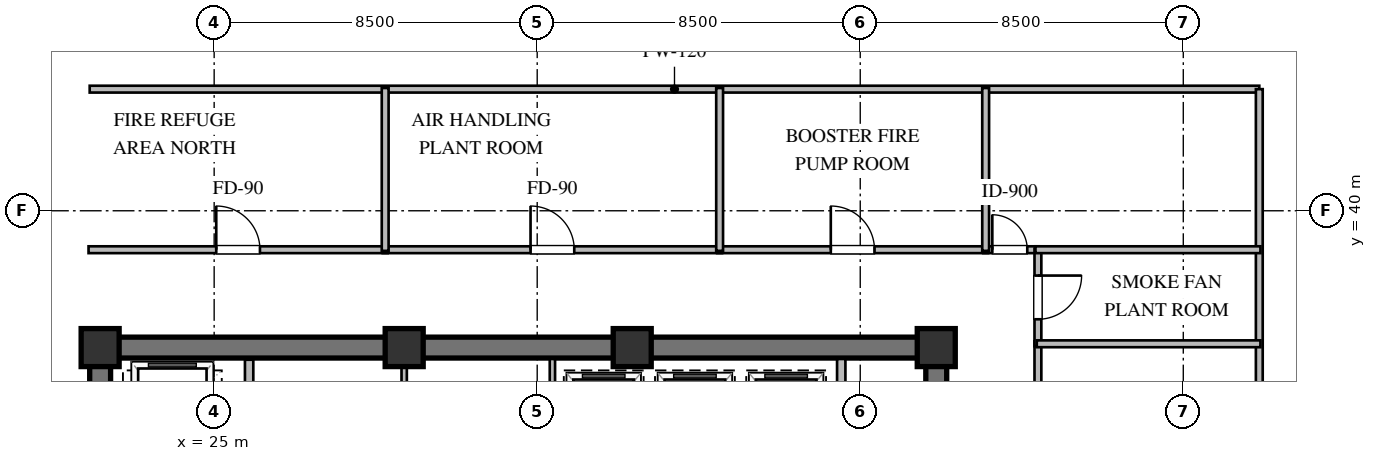
"""IFC4 building model, lengths in metres.
Left out: names, types, materials, properties, quantities, classifications, styles, units other than length and angle.
Written with IfcOpenShell. Run it as: python <this file> out.ifc"""

import sys

from ifc_helpers import new_model, si_unit, direction, frame, frame_2d, origin, origin_2d, place, context, subcontext, project, spatial, rectangle, extrude, element, fill, save


model = new_model("IFC4")
c1 = context("Model", 3, precision=1e-05, world=origin(), true_north=direction((0.0, 1.0)))
c2 = subcontext(c1, "Body", "Model", "MODEL_VIEW")
j1 = project(units=[si_unit("LENGTHUNIT", "METRE"), si_unit("PLANEANGLEUNIT", "RADIAN")], contexts=[c1])
p1 = place(None, origin())
s1 = spatial("IfcSite", under=j1, at=p1, CompositionType="ELEMENT")
p2 = place(p1, origin())
s2 = spatial("IfcBuilding", under=s1, at=p2, CompositionType="ELEMENT")
p3 = place(p2, frame((0.0, 0.0, 181.8)))
s3 = spatial("IfcBuildingStorey", under=s2, at=p3, CompositionType="ELEMENT", Elevation=181.8)
p4 = place(p3, frame((21.725, 36.4, 0.0), z_axis=(0.0, 0.0, 1.0), x_axis=(1.0, 0.0, 0.0)))
e1 = element("IfcWall", 1, at=p4, inside=s3, PredefinedType="SHEAR", context=c2, shape_type="SweptSolid", body=[
    extrude(rectangle(XDim=22.55, YDim=0.55, at=frame_2d((11.275, 0.0))), origin(), (0.0, 0.0, 1.0), 5.16),
])
p5 = place(p3, frame((22.0, 23.875, 0.0), z_axis=(0.0, 0.0, 1.0), x_axis=(0.0, 1.0, 0.0)))
e2 = element("IfcWall", 2, at=p5, inside=s3, PredefinedType="SHEAR", context=c2, shape_type="SweptSolid", body=[
    extrude(rectangle(XDim=12.25, YDim=0.55, at=frame_2d((6.125, 0.0))), origin(), (0.0, 0.0, 1.0), 5.16),
])
p6 = place(p3, frame((44.0, 23.875, 0.0), z_axis=(0.0, 0.0, 1.0), x_axis=(0.0, 1.0, 0.0)))
e3 = element("IfcWall", 3, at=p6, inside=s3, PredefinedType="SHEAR", context=c2, shape_type="SweptSolid", body=[
    extrude(rectangle(XDim=12.25, YDim=0.55, at=frame_2d((6.125, 0.0))), origin(), (0.0, 0.0, 1.0), 5.16),
])
p7 = place(p6, frame((8.725, 0.0, 0.0)))
e4 = element("IfcOpeningElement", 4, at=p7, cuts=e3, PredefinedType="OPENING", context=c2, shape_type="SweptSolid", body=[
    extrude(rectangle(XDim=1.5, YDim=2.15, at=frame_2d((0.75, 1.075))), frame((0.0, 0.285, 0.0), z_axis=(0.0, -1.0, 0.0), x_axis=(1.0, 0.0, 0.0)), (0.0, 0.0, 1.0), 0.57),
])
for number, where, z_axis, x_axis in (
    (5, (44.0, 36.4, 0.0), (0.0, 0.0, 1.0), (1.0, 0.0, 0.0)),
    (6, (36.0, 36.4, 0.0), (0.0, 0.0, 1.0), (1.0, 0.0, 0.0)),
    (7, (30.0, 36.4, 0.0), (0.0, 0.0, 1.0), (1.0, 0.0, 0.0)),
    (8, (22.0, 36.4, 0.0), (0.0, 0.0, 1.0), (1.0, 0.0, 0.0)),
):
    element("IfcColumn", number, at=place(p3, frame(where, z_axis=z_axis, x_axis=x_axis)), inside=s3, PredefinedType="COLUMN", context=c2, shape_type="SweptSolid", body=[
        extrude(rectangle(XDim=1.0, YDim=1.0, at=origin_2d()), origin(), (0.0, 0.0, 1.0), 5.4),
    ])
p8 = place(p3, frame((25.92, 33.35, 0.0), z_axis=(0.0, 0.0, 1.0), x_axis=(0.0, 1.0, 0.0)))
e9 = element("IfcWall", 9, at=p8, inside=s3, PredefinedType="SOLIDWALL", context=c2, shape_type="SweptSolid", body=[
    extrude(rectangle(XDim=2.73, YDim=0.22, at=frame_2d((1.365, 0.0))), origin(), (0.0, 0.0, 1.0), 5.16),
])
for number, where, z_axis, x_axis in (
    (10, (30.0, 33.35, 0.0), (0.0, 0.0, 1.0), (0.0, 1.0, 0.0)),
    (11, (33.9, 33.35, 0.0), (0.0, 0.0, 1.0), (0.0, 1.0, 0.0)),
):
    element("IfcWall", number, at=place(p3, frame(where, z_axis=z_axis, x_axis=x_axis)), inside=s3, PredefinedType="PARTITIONING", context=c2, shape_type="SweptSolid", body=[
        extrude(rectangle(XDim=2.75, YDim=0.14, at=frame_2d((1.375, 0.0))), origin(), (0.0, 0.0, 1.0), 5.16),
    ])
p9 = place(p3, frame((41.5, 33.35, 0.0), z_axis=(0.0, 0.0, 1.0), x_axis=(0.0, 1.0, 0.0)))
e12 = element("IfcWall", 12, at=p9, inside=s3, PredefinedType="SOLIDWALL", context=c2, shape_type="SweptSolid", body=[
    extrude(rectangle(XDim=2.75, YDim=0.22, at=frame_2d((1.375, 0.0))), origin(), (0.0, 0.0, 1.0), 5.16),
])
p10 = place(p3, frame((21.725, 43.2, 0.0), z_axis=(0.0, 0.0, 1.0), x_axis=(1.0, 0.0, 0.0)))
e13 = element("IfcWall", 13, at=p10, inside=s3, PredefinedType="PARTITIONING", context=c2, shape_type="SweptSolid", body=[
    extrude(rectangle(XDim=30.775, YDim=0.18, at=frame_2d((15.387, 0.0))), origin(), (0.0, 0.0, 1.0), 5.16),
])
p11 = place(p3, frame((52.5, 23.4, 0.0), z_axis=(0.0, 0.0, 1.0), x_axis=(0.0, 1.0, 0.0)))
e14 = element("IfcWall", 14, at=p11, inside=s3, PredefinedType="PARTITIONING", context=c2, shape_type="SweptSolid", body=[
    extrude(rectangle(XDim=19.8, YDim=0.18, at=frame_2d((9.9, 0.0))), origin(), (0.0, 0.0, 1.0), 5.16),
])
p12 = place(p3, frame((21.695, 38.975, 0.0), z_axis=(0.0, 0.0, 1.0), x_axis=(1.0, 0.0, 0.0)))
e15 = element("IfcWall", 15, at=p12, inside=s3, PredefinedType="PARTITIONING", context=c2, shape_type="SweptSolid", body=[
    extrude(rectangle(XDim=7.87, YDim=0.18, at=frame_2d((3.935, 0.0))), origin(), (0.0, 0.0, 1.0), 5.16),
])
p13 = place(p12, frame((3.36, 0.0, 0.0)))
e16 = element("IfcOpeningElement", 16, at=p13, cuts=e15, PredefinedType="OPENING", context=c2, shape_type="SweptSolid", body=[
    extrude(rectangle(XDim=1.15, YDim=2.1, at=frame_2d((0.575, 1.05))), frame((0.0, 0.1, 0.0), z_axis=(0.0, -1.0, 0.0), x_axis=(1.0, 0.0, 0.0)), (0.0, 0.0, 1.0), 0.2),
])
p14 = place(p3, frame((46.675, 36.565, 0.0), z_axis=(0.0, 0.0, 1.0), x_axis=(0.0, -1.0, 0.0)))
e17 = element("IfcWall", 17, at=p14, inside=s3, PredefinedType="PARTITIONING", context=c2, shape_type="SweptSolid", body=[
    extrude(rectangle(XDim=13.195, YDim=0.18, at=frame_2d((6.597, 0.0))), origin(), (0.0, 0.0, 1.0), 5.16),
])
p15 = place(p14, frame((6.022, 0.0, 0.0)))
e18 = element("IfcOpeningElement", 18, at=p15, cuts=e17, PredefinedType="OPENING", context=c2, shape_type="SweptSolid", body=[
    extrude(rectangle(XDim=1.15, YDim=2.1, at=frame_2d((0.575, 1.05))), frame((0.0, 0.1, 0.0), z_axis=(0.0, -1.0, 0.0), x_axis=(1.0, 0.0, 0.0)), (0.0, 0.0, 1.0), 0.2),
])
p16 = place(p3, frame((29.435, 38.975, 0.0), z_axis=(0.0, 0.0, 1.0), x_axis=(1.0, 0.0, 0.0)))
e19 = element("IfcWall", 19, at=p16, inside=s3, PredefinedType="PARTITIONING", context=c2, shape_type="SweptSolid", body=[
    extrude(rectangle(XDim=8.93, YDim=0.18, at=frame_2d((4.465, 0.0))), origin(), (0.0, 0.0, 1.0), 5.16),
])
p17 = place(p16, frame((3.89, 0.0, 0.0)))
e20 = element("IfcOpeningElement", 20, at=p17, cuts=e19, PredefinedType="OPENING", context=c2, shape_type="SweptSolid", body=[
    extrude(rectangle(XDim=1.15, YDim=2.1, at=frame_2d((0.575, 1.05))), frame((0.0, 0.1, 0.0), z_axis=(0.0, -1.0, 0.0), x_axis=(1.0, 0.0, 0.0)), (0.0, 0.0, 1.0), 0.2),
])
p18 = place(p3, frame((38.235, 38.975, 0.0), z_axis=(0.0, 0.0, 1.0), x_axis=(1.0, 0.0, 0.0)))
e21 = element("IfcWall", 21, at=p18, inside=s3, PredefinedType="PARTITIONING", context=c2, shape_type="SweptSolid", body=[
    extrude(rectangle(XDim=7.13, YDim=0.18, at=frame_2d((3.565, 0.0))), origin(), (0.0, 0.0, 1.0), 5.16),
])
p19 = place(p18, frame((2.99, 0.0, 0.0)))
e22 = element("IfcOpeningElement", 22, at=p19, cuts=e21, PredefinedType="OPENING", context=c2, shape_type="SweptSolid", body=[
    extrude(rectangle(XDim=1.15, YDim=2.1, at=frame_2d((0.575, 1.05))), frame((0.0, 0.1, 0.0), z_axis=(0.0, -1.0, 0.0), x_axis=(1.0, 0.0, 0.0)), (0.0, 0.0, 1.0), 0.2),
])
p20 = place(p3, frame((45.235, 38.975, 0.0), z_axis=(0.0, 0.0, 1.0), x_axis=(1.0, 0.0, 0.0)))
e23 = element("IfcWall", 23, at=p20, inside=s3, PredefinedType="PARTITIONING", context=c2, shape_type="SweptSolid", body=[
    extrude(rectangle(XDim=1.47, YDim=0.18, at=frame_2d((0.735, 0.0))), origin(), (0.0, 0.0, 1.0), 5.16),
])
p21 = place(p20, frame((0.24, 0.0, 0.0)))
e24 = element("IfcOpeningElement", 24, at=p21, cuts=e23, PredefinedType="OPENING", context=c2, shape_type="SweptSolid", body=[
    extrude(rectangle(XDim=0.92, YDim=2.1, at=frame_2d((0.46, 1.05))), frame((0.0, 0.1, 0.0), z_axis=(0.0, -1.0, 0.0), x_axis=(1.0, 0.0, 0.0)), (0.0, 0.0, 1.0), 0.2),
])
p22 = place(p3, frame((46.675, 39.005, 0.0), z_axis=(0.0, 0.0, 1.0), x_axis=(0.0, -1.0, 0.0)))
e25 = element("IfcWall", 25, at=p22, inside=s3, PredefinedType="PARTITIONING", context=c2, shape_type="SweptSolid", body=[
    extrude(rectangle(XDim=2.57, YDim=0.18, at=frame_2d((1.285, 0.0))), origin(), (0.0, 0.0, 1.0), 5.16),
])
p23 = place(p22, frame((0.71, 0.0, 0.0)))
e26 = element("IfcOpeningElement", 26, at=p23, cuts=e25, PredefinedType="OPENING", context=c2, shape_type="SweptSolid", body=[
    extrude(rectangle(XDim=1.15, YDim=2.1, at=frame_2d((0.575, 1.05))), frame((0.0, 0.1, 0.0), z_axis=(0.0, -1.0, 0.0), x_axis=(1.0, 0.0, 0.0)), (0.0, 0.0, 1.0), 0.2),
])
p24 = place(p3, frame((29.5, 43.23, 0.0), z_axis=(0.0, 0.0, 1.0), x_axis=(0.0, -1.0, 0.0)))
e27 = element("IfcWall", 27, at=p24, inside=s3, PredefinedType="PARTITIONING", context=c2, shape_type="SweptSolid", body=[
    extrude(rectangle(XDim=4.285, YDim=0.18, at=frame_2d((2.143, 0.0))), origin(), (0.0, 0.0, 1.0), 5.16),
])
p25 = place(p3, frame((46.645, 36.5, 0.0), z_axis=(0.0, 0.0, 1.0), x_axis=(1.0, 0.0, 0.0)))
e28 = element("IfcWall", 28, at=p25, inside=s3, PredefinedType="PARTITIONING", context=c2, shape_type="SweptSolid", body=[
    extrude(rectangle(XDim=5.885, YDim=0.18, at=frame_2d((2.942, 0.0))), origin(), (0.0, 0.0, 1.0), 3.65),
])
for number, where, z_axis, x_axis in (
    (29, (38.3, 43.23, 0.0), (0.0, 0.0, 1.0), (0.0, -1.0, 0.0)),
    (30, (45.3, 43.23, 0.0), (0.0, 0.0, 1.0), (0.0, -1.0, 0.0)),
):
    element("IfcWall", number, at=place(p3, frame(where, z_axis=z_axis, x_axis=x_axis)), inside=s3, PredefinedType="PARTITIONING", context=c2, shape_type="SweptSolid", body=[
        extrude(rectangle(XDim=4.285, YDim=0.18, at=frame_2d((2.143, 0.0))), origin(), (0.0, 0.0, 1.0), 5.16),
    ])
p26 = place(p3, frame((52.53, 38.975, 0.0), z_axis=(0.0, 0.0, 1.0), x_axis=(-1.0, 0.0, 0.0)))
e31 = element("IfcWall", 31, at=p26, inside=s3, PredefinedType="PARTITIONING", context=c2, shape_type="SweptSolid", body=[
    extrude(rectangle(XDim=5.92, YDim=0.18, at=frame_2d((2.96, 0.0))), origin(), (0.0, 0.0, 1.0), 5.16),
])
p27 = place(p13, origin())
e32 = element("IfcDoor", 32, at=p27, inside=s3, OperationType="SINGLE_SWING_LEFT", PredefinedType="DOOR", context=c2, shape_type="SweptSolid", body=[
    extrude(rectangle(XDim=1.15, YDim=2.1, at=frame_2d((0.575, 1.05))), frame((0.0, 0.025, 0.0), z_axis=(0.0, -1.0, 0.0), x_axis=(1.0, 0.0, 0.0)), (0.0, 0.0, 1.0), 0.05),
])
fill(e16, e32)
p28 = place(p17, origin())
e33 = element("IfcDoor", 33, at=p28, inside=s3, OperationType="SINGLE_SWING_LEFT", PredefinedType="DOOR", context=c2, shape_type="SweptSolid", body=[
    extrude(rectangle(XDim=1.15, YDim=2.1, at=frame_2d((0.575, 1.05))), frame((0.0, 0.025, 0.0), z_axis=(0.0, -1.0, 0.0), x_axis=(1.0, 0.0, 0.0)), (0.0, 0.0, 1.0), 0.05),
])
fill(e20, e33)
p29 = place(p19, origin())
e34 = element("IfcDoor", 34, at=p29, inside=s3, OperationType="SINGLE_SWING_LEFT", PredefinedType="DOOR", context=c2, shape_type="SweptSolid", body=[
    extrude(rectangle(XDim=1.15, YDim=2.1, at=frame_2d((0.575, 1.05))), frame((0.0, 0.025, 0.0), z_axis=(0.0, -1.0, 0.0), x_axis=(1.0, 0.0, 0.0)), (0.0, 0.0, 1.0), 0.05),
])
fill(e22, e34)
p30 = place(p21, origin())
e35 = element("IfcDoor", 35, at=p30, inside=s3, OperationType="SINGLE_SWING_LEFT", PredefinedType="DOOR", context=c2, shape_type="SweptSolid", body=[
    extrude(rectangle(XDim=0.92, YDim=2.1, at=frame_2d((0.46, 1.05))), frame((0.0, 0.025, 0.0), z_axis=(0.0, -1.0, 0.0), x_axis=(1.0, 0.0, 0.0)), (0.0, 0.0, 1.0), 0.05),
])
fill(e24, e35)
p31 = place(p23, origin())
e36 = element("IfcDoor", 36, at=p31, inside=s3, OperationType="SINGLE_SWING_LEFT", PredefinedType="DOOR", context=c2, shape_type="SweptSolid", body=[
    extrude(rectangle(XDim=1.15, YDim=2.1, at=frame_2d((0.575, 1.05))), frame((0.0, 0.025, 0.0), z_axis=(0.0, -1.0, 0.0), x_axis=(1.0, 0.0, 0.0)), (0.0, 0.0, 1.0), 0.05),
])
fill(e26, e36)
save(model, sys.argv[1])
